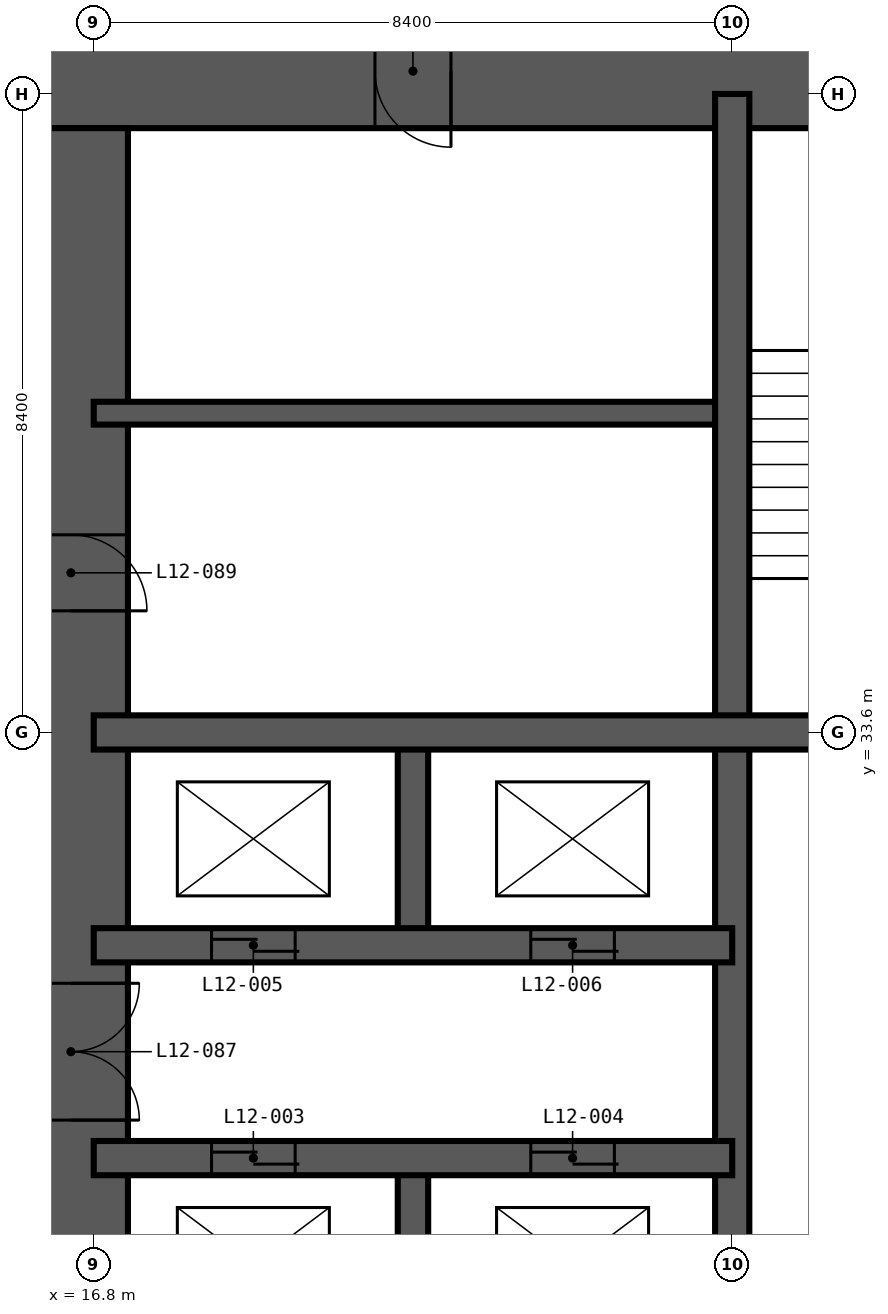
"""IFC4 building model, lengths in metres.
Left out: names, types, materials, properties, quantities, classifications, styles, units other than length and angle.
Written with IfcOpenShell. Run it as: python <this file> out.ifc"""

import sys

from ifc_helpers import new_model, si_unit, direction, frame, frame_2d, origin, place, context, subcontext, project, spatial, rectangle, extrude, element, fill, save


model = new_model("IFC4")
c1 = context("Model", 3, precision=1e-05, world=origin(), true_north=direction((0.0, 1.0)))
c2 = subcontext(c1, "Body", "Model", "MODEL_VIEW")
j1 = project(units=[si_unit("LENGTHUNIT", "METRE"), si_unit("PLANEANGLEUNIT", "RADIAN")], contexts=[c1])
p1 = place(None, origin())
s1 = spatial("IfcSite", under=j1, at=p1, CompositionType="ELEMENT")
p2 = place(p1, origin())
s2 = spatial("IfcBuilding", under=s1, at=p2, CompositionType="ELEMENT")
p3 = place(p2, frame((0.0, 0.0, 52.2)))
s3 = spatial("IfcBuildingStorey", under=s2, at=p3, CompositionType="ELEMENT", Elevation=52.2)
p4 = place(p3, frame((43.05, 42.3, -0.35), z_axis=(0.0, 0.0, 1.0), x_axis=(-1.0, 0.0, 0.0)))
e1 = element("IfcWall", 1, at=p4, inside=s3, PredefinedType="SHEAR", context=c2, shape_type="SweptSolid", body=[
    extrude(rectangle(XDim=27.3, YDim=1.5, at=frame_2d((13.65, 0.0))), origin(), (0.0, 0.0, 1.0), 3.6),
])
p5 = place(p4, frame((21.55, 0.0, 0.35)))
e2 = element("IfcOpeningElement", 2, at=p5, cuts=e1, PredefinedType="OPENING", context=c2, shape_type="SweptSolid", body=[
    extrude(rectangle(XDim=1.0, YDim=2.1, at=frame_2d((0.5, 1.05))), frame((0.0, 0.76, 0.0), z_axis=(0.0, -1.0, 0.0), x_axis=(1.0, 0.0, 0.0)), (0.0, 0.0, 1.0), 1.52),
])
p6 = place(p4, frame((10.95, 0.0, 0.35)))
e3 = element("IfcOpeningElement", 3, at=p6, cuts=e1, PredefinedType="OPENING", context=c2, shape_type="SweptSolid", body=[
    extrude(rectangle(XDim=1.2, YDim=2.2, at=frame_2d((0.6, 1.1))), frame((0.0, 0.76, 0.0), z_axis=(0.0, -1.0, 0.0), x_axis=(1.0, 0.0, 0.0)), (0.0, 0.0, 1.0), 1.52),
])
p7 = place(p3, frame((16.5, 41.55, -0.35), z_axis=(0.0, 0.0, 1.0), x_axis=(0.0, -1.0, 0.0)))
e4 = element("IfcWall", 4, at=p7, inside=s3, PredefinedType="SHEAR", context=c2, shape_type="SweptSolid", body=[
    extrude(rectangle(XDim=24.3, YDim=1.5, at=frame_2d((12.15, 0.0))), origin(), (0.0, 0.0, 1.0), 3.6),
])
p8 = place(p7, frame((11.25, 0.0, 0.35)))
e5 = element("IfcOpeningElement", 5, at=p8, cuts=e4, PredefinedType="OPENING", context=c2, shape_type="SweptSolid", body=[
    extrude(rectangle(XDim=1.8, YDim=2.2, at=frame_2d((0.9, 1.1))), frame((0.0, 0.76, 0.0), z_axis=(0.0, -1.0, 0.0), x_axis=(1.0, 0.0, 0.0)), (0.0, 0.0, 1.0), 1.52),
])
p9 = place(p7, frame((20.05, 0.0, 0.35)))
e6 = element("IfcOpeningElement", 6, at=p9, cuts=e4, PredefinedType="OPENING", context=c2, shape_type="SweptSolid", body=[
    extrude(rectangle(XDim=1.0, YDim=2.1, at=frame_2d((0.5, 1.05))), frame((0.0, 0.76, 0.0), z_axis=(0.0, -1.0, 0.0), x_axis=(1.0, 0.0, 0.0)), (0.0, 0.0, 1.0), 1.52),
])
p10 = place(p7, frame((5.35, 0.0, 0.35)))
e7 = element("IfcOpeningElement", 7, at=p10, cuts=e4, PredefinedType="OPENING", context=c2, shape_type="SweptSolid", body=[
    extrude(rectangle(XDim=1.0, YDim=2.1, at=frame_2d((0.5, 1.05))), frame((0.0, 0.76, 0.0), z_axis=(0.0, -1.0, 0.0), x_axis=(1.0, 0.0, 0.0)), (0.0, 0.0, 1.0), 1.52),
])
p11 = place(p3, frame((16.8, 37.8, -0.35), z_axis=(0.0, 0.0, 1.0), x_axis=(1.0, 0.0, 0.0)))
e8 = element("IfcWall", 8, at=p11, inside=s3, PredefinedType="SHEAR", context=c2, shape_type="SweptSolid", body=[
    extrude(rectangle(XDim=8.4, YDim=0.3, at=frame_2d((4.2, 0.0))), origin(), (0.0, 0.0, 1.0), 3.6),
])
for number, where, z_axis, x_axis in (
    (9, (21.0, 25.2, -0.35), (0.0, 0.0, 1.0), (0.0, 1.0, 0.0)),
    (10, (21.0, 30.8, -0.35), (0.0, 0.0, 1.0), (0.0, 1.0, 0.0)),
):
    element("IfcWall", number, at=place(p3, frame(where, z_axis=z_axis, x_axis=x_axis)), inside=s3, PredefinedType="SHEAR", context=c2, shape_type="SweptSolid", body=[
        extrude(rectangle(XDim=2.8, YDim=0.4, at=frame_2d((1.4, 0.0))), origin(), (0.0, 0.0, 1.0), 3.6),
    ])
p12 = place(p3, frame((25.2, 16.8, -0.35), z_axis=(0.0, 0.0, 1.0), x_axis=(0.0, 1.0, 0.0)))
e11 = element("IfcWall", 11, at=p12, inside=s3, PredefinedType="SHEAR", context=c2, shape_type="SweptSolid", body=[
    extrude(rectangle(XDim=25.2, YDim=0.45, at=frame_2d((12.6, 0.0))), origin(), (0.0, 0.0, 1.0), 3.6),
])
p13 = place(p3, frame((16.8, 28.0, -0.35), z_axis=(0.0, 0.0, 1.0), x_axis=(1.0, 0.0, 0.0)))
e12 = element("IfcWall", 12, at=p13, inside=s3, PredefinedType="SHEAR", context=c2, shape_type="SweptSolid", body=[
    extrude(rectangle(XDim=8.4, YDim=0.45, at=frame_2d((4.2, 0.0))), origin(), (0.0, 0.0, 1.0), 3.6),
])
p14 = place(p13, frame((1.55, 0.0, 0.35)))
e13 = element("IfcOpeningElement", 13, at=p14, cuts=e12, PredefinedType="OPENING", context=c2, shape_type="SweptSolid", body=[
    extrude(rectangle(XDim=1.1, YDim=2.2, at=frame_2d((0.55, 1.1))), frame((0.0, 0.235, 0.0), z_axis=(0.0, -1.0, 0.0), x_axis=(1.0, 0.0, 0.0)), (0.0, 0.0, 1.0), 0.47),
])
p15 = place(p13, frame((5.75, 0.0, 0.35)))
e14 = element("IfcOpeningElement", 14, at=p15, cuts=e12, PredefinedType="OPENING", context=c2, shape_type="SweptSolid", body=[
    extrude(rectangle(XDim=1.1, YDim=2.2, at=frame_2d((0.55, 1.1))), frame((0.0, 0.235, 0.0), z_axis=(0.0, -1.0, 0.0), x_axis=(1.0, 0.0, 0.0)), (0.0, 0.0, 1.0), 0.47),
])
p16 = place(p3, frame((16.8, 30.8, -0.35), z_axis=(0.0, 0.0, 1.0), x_axis=(1.0, 0.0, 0.0)))
e15 = element("IfcWall", 15, at=p16, inside=s3, PredefinedType="SHEAR", context=c2, shape_type="SweptSolid", body=[
    extrude(rectangle(XDim=8.4, YDim=0.45, at=frame_2d((4.2, 0.0))), origin(), (0.0, 0.0, 1.0), 3.6),
])
p17 = place(p16, frame((1.55, 0.0, 0.35)))
e16 = element("IfcOpeningElement", 16, at=p17, cuts=e15, PredefinedType="OPENING", context=c2, shape_type="SweptSolid", body=[
    extrude(rectangle(XDim=1.1, YDim=2.2, at=frame_2d((0.55, 1.1))), frame((0.0, 0.235, 0.0), z_axis=(0.0, -1.0, 0.0), x_axis=(1.0, 0.0, 0.0)), (0.0, 0.0, 1.0), 0.47),
])
p18 = place(p16, frame((5.75, 0.0, 0.35)))
e17 = element("IfcOpeningElement", 17, at=p18, cuts=e15, PredefinedType="OPENING", context=c2, shape_type="SweptSolid", body=[
    extrude(rectangle(XDim=1.1, YDim=2.2, at=frame_2d((0.55, 1.1))), frame((0.0, 0.235, 0.0), z_axis=(0.0, -1.0, 0.0), x_axis=(1.0, 0.0, 0.0)), (0.0, 0.0, 1.0), 0.47),
])
p19 = place(p3, frame((16.8, 33.6, -0.35), z_axis=(0.0, 0.0, 1.0), x_axis=(1.0, 0.0, 0.0)))
e18 = element("IfcWall", 18, at=p19, inside=s3, PredefinedType="SHEAR", context=c2, shape_type="SweptSolid", body=[
    extrude(rectangle(XDim=25.2, YDim=0.45, at=frame_2d((12.6, 0.0))), origin(), (0.0, 0.0, 1.0), 3.6),
])
p20 = place(p14, origin())
e19 = element("IfcDoor", 19, at=p20, inside=s3, OperationType="DOUBLE_DOOR_SLIDING", PredefinedType="DOOR", context=c2, shape_type="SweptSolid", body=[
    extrude(rectangle(XDim=1.1, YDim=2.2, at=frame_2d((0.55, 1.1))), frame((0.0, 0.025, 0.0), z_axis=(0.0, -1.0, 0.0), x_axis=(1.0, 0.0, 0.0)), (0.0, 0.0, 1.0), 0.05),
])
fill(e13, e19)
p21 = place(p15, origin())
e20 = element("IfcDoor", 20, at=p21, inside=s3, OperationType="DOUBLE_DOOR_SLIDING", PredefinedType="DOOR", context=c2, shape_type="SweptSolid", body=[
    extrude(rectangle(XDim=1.1, YDim=2.2, at=frame_2d((0.55, 1.1))), frame((0.0, 0.025, 0.0), z_axis=(0.0, -1.0, 0.0), x_axis=(1.0, 0.0, 0.0)), (0.0, 0.0, 1.0), 0.05),
])
fill(e14, e20)
p22 = place(p17, origin())
e21 = element("IfcDoor", 21, at=p22, inside=s3, OperationType="DOUBLE_DOOR_SLIDING", PredefinedType="DOOR", context=c2, shape_type="SweptSolid", body=[
    extrude(rectangle(XDim=1.1, YDim=2.2, at=frame_2d((0.55, 1.1))), frame((0.0, 0.025, 0.0), z_axis=(0.0, -1.0, 0.0), x_axis=(1.0, 0.0, 0.0)), (0.0, 0.0, 1.0), 0.05),
])
fill(e16, e21)
p23 = place(p18, origin())
e22 = element("IfcDoor", 22, at=p23, inside=s3, OperationType="DOUBLE_DOOR_SLIDING", PredefinedType="DOOR", context=c2, shape_type="SweptSolid", body=[
    extrude(rectangle(XDim=1.1, YDim=2.2, at=frame_2d((0.55, 1.1))), frame((0.0, 0.025, 0.0), z_axis=(0.0, -1.0, 0.0), x_axis=(1.0, 0.0, 0.0)), (0.0, 0.0, 1.0), 0.05),
])
fill(e17, e22)
p24 = place(p8, origin())
e23 = element("IfcDoor", 23, at=p24, inside=s3, OperationType="DOUBLE_DOOR_DOUBLE_SWING", PredefinedType="DOOR", context=c2, shape_type="SweptSolid", body=[
    extrude(rectangle(XDim=1.8, YDim=2.2, at=frame_2d((0.9, 1.1))), frame((0.0, 0.025, 0.0), z_axis=(0.0, -1.0, 0.0), x_axis=(1.0, 0.0, 0.0)), (0.0, 0.0, 1.0), 0.05),
])
fill(e5, e23)
p25 = place(p10, origin())
e24 = element("IfcDoor", 24, at=p25, inside=s3, OperationType="SINGLE_SWING_RIGHT", PredefinedType="DOOR", context=c2, shape_type="SweptSolid", body=[
    extrude(rectangle(XDim=1.0, YDim=2.1, at=frame_2d((0.5, 1.05))), frame((0.0, 0.025, 0.0), z_axis=(0.0, -1.0, 0.0), x_axis=(1.0, 0.0, 0.0)), (0.0, 0.0, 1.0), 0.05),
])
fill(e7, e24)
p26 = place(p5, origin())
e25 = element("IfcDoor", 25, at=p26, inside=s3, OperationType="SINGLE_SWING_LEFT", PredefinedType="DOOR", context=c2, shape_type="SweptSolid", body=[
    extrude(rectangle(XDim=1.0, YDim=2.1, at=frame_2d((0.5, 1.05))), frame((0.0, 0.025, 0.0), z_axis=(0.0, -1.0, 0.0), x_axis=(1.0, 0.0, 0.0)), (0.0, 0.0, 1.0), 0.05),
])
fill(e2, e25)
save(model, sys.argv[1])
